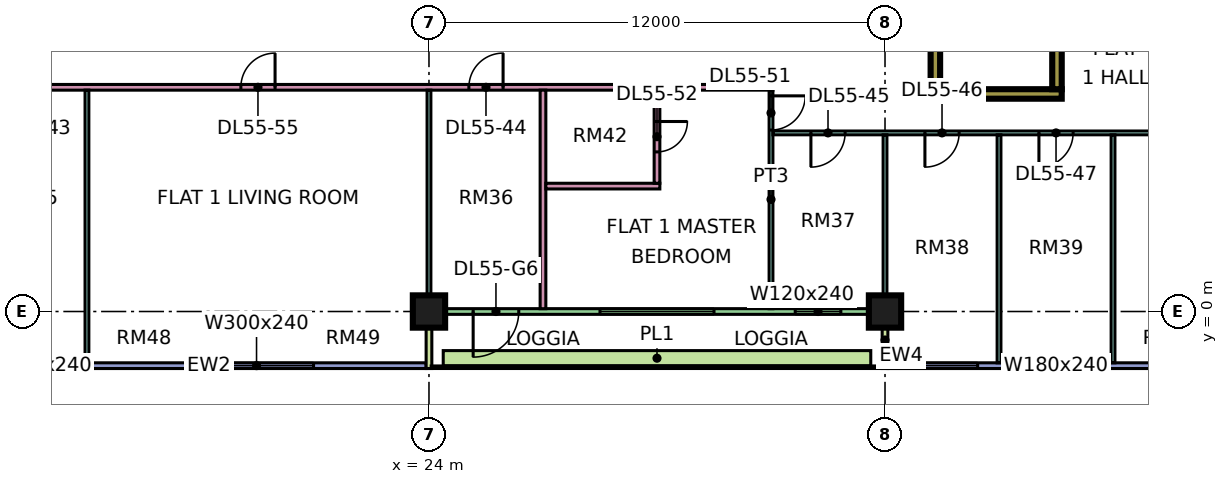
"""IFC4 building model, lengths in metres.
Left out: names, types, materials, properties, quantities, classifications, styles, units other than length and angle.
Written with IfcOpenShell. Run it as: python <this file> out.ifc"""

import sys

from ifc_helpers import new_model, si_unit, direction, frame, frame_2d, origin, origin_2d, place, context, subcontext, project, spatial, rectangle, extrude, element, fill, save


model = new_model("IFC4")
c1 = context("Model", 3, precision=1e-05, world=origin(), true_north=direction((0.0, 1.0)))
c2 = subcontext(c1, "Body", "Model", "MODEL_VIEW")
j1 = project(units=[si_unit("LENGTHUNIT", "METRE"), si_unit("PLANEANGLEUNIT", "RADIAN")], contexts=[c1])
p1 = place(None, origin())
s1 = spatial("IfcSite", under=j1, at=p1, CompositionType="ELEMENT")
p2 = place(p1, origin())
s2 = spatial("IfcBuilding", under=s1, at=p2, CompositionType="ELEMENT")
p3 = place(p2, frame((0.0, 0.0, 234.15)))
s3 = spatial("IfcBuildingStorey", under=s2, at=p3, CompositionType="ELEMENT", Elevation=234.15)
for number, where, z_axis, x_axis in (
    (1, (24.0, 0.0, 0.0), (0.0, 0.0, 1.0), (1.0, 0.0, 0.0)),
    (2, (36.0, 0.0, 0.0), (0.0, 0.0, 1.0), (1.0, 0.0, 0.0)),
):
    element("IfcColumn", number, at=place(p3, frame(where, z_axis=z_axis, x_axis=x_axis)), inside=s3, PredefinedType="COLUMN", context=c2, shape_type="SweptSolid", body=[
        extrude(rectangle(XDim=0.85, YDim=0.85, at=origin_2d()), origin(), (0.0, 0.0, 1.0), 3.75),
    ])
p4 = place(p3, frame((37.2, 5.725, 0.0), z_axis=(0.0, 0.0, 1.0), x_axis=(1.0, 0.0, 0.0)))
e3 = element("IfcWall", 3, at=p4, inside=s3, PredefinedType="SHEAR", context=c2, shape_type="SweptSolid", body=[
    extrude(rectangle(XDim=3.45, YDim=0.25, at=frame_2d((1.725, 0.0))), origin(), (0.0, 0.0, 1.0), 3.75),
])
for number, where, z_axis, x_axis in (
    (4, (37.325, 5.85, 0.0), (0.0, 0.0, 1.0), (0.0, 1.0, 0.0)),
    (5, (40.525, 5.85, 0.0), (0.0, 0.0, 1.0), (0.0, 1.0, 0.0)),
):
    element("IfcWall", number, at=place(p3, frame(where, z_axis=z_axis, x_axis=x_axis)), inside=s3, PredefinedType="SHEAR", context=c2, shape_type="SweptSolid", body=[
        extrude(rectangle(XDim=6.5, YDim=0.25, at=frame_2d((3.25, 0.0))), origin(), (0.0, 0.0, 1.0), 3.75),
    ])
p5 = place(p3, frame((12.5, -1.425, 0.0), z_axis=(0.0, 0.0, 1.0), x_axis=(1.0, 0.0, 0.0)))
e6 = element("IfcWall", 6, at=p5, inside=s3, PredefinedType="SOLIDWALL", context=c2, shape_type="SweptSolid", body=[
    extrude(rectangle(XDim=11.425, YDim=0.15, at=frame_2d((5.712, 0.0))), origin(), (0.0, 0.0, 1.0), 3.35),
])
p6 = place(p5, frame((0.35, 0.0, 0.45)))
e7 = element("IfcOpeningElement", 7, at=p6, cuts=e6, PredefinedType="OPENING", context=c2, shape_type="SweptSolid", body=[
    extrude(rectangle(XDim=1.8, YDim=2.4, at=frame_2d((0.9, 1.2))), frame((0.0, 0.085, 0.0), z_axis=(0.0, -1.0, 0.0), x_axis=(1.0, 0.0, 0.0)), (0.0, 0.0, 1.0), 0.17),
])
p7 = place(p5, frame((5.462, 0.0, 0.45)))
e8 = element("IfcOpeningElement", 8, at=p7, cuts=e6, PredefinedType="OPENING", context=c2, shape_type="SweptSolid", body=[
    extrude(rectangle(XDim=3.0, YDim=2.4, at=frame_2d((1.5, 1.2))), frame((0.0, 0.085, 0.0), z_axis=(0.0, -1.0, 0.0), x_axis=(1.0, 0.0, 0.0)), (0.0, 0.0, 1.0), 0.17),
])
p8 = place(p3, frame((24.075, 0.0, 0.0), z_axis=(0.0, 0.0, 1.0), x_axis=(1.0, 0.0, 0.0)))
e9 = element("IfcWall", 9, at=p8, inside=s3, PredefinedType="SOLIDWALL", context=c2, shape_type="SweptSolid", body=[
    extrude(rectangle(XDim=11.85, YDim=0.15, at=frame_2d((5.925, 0.0))), origin(), (0.0, 0.0, 1.0), 3.35),
])
p9 = place(p8, frame((1.087, 0.0, 0.0)))
e10 = element("IfcOpeningElement", 10, at=p9, cuts=e9, PredefinedType="OPENING", context=c2, shape_type="SweptSolid", body=[
    extrude(rectangle(XDim=1.2, YDim=2.4, at=frame_2d((0.6, 1.2))), frame((0.0, 0.085, 0.0), z_axis=(0.0, -1.0, 0.0), x_axis=(1.0, 0.0, 0.0)), (0.0, 0.0, 1.0), 0.17),
])
p10 = place(p8, frame((4.425, 0.0, 0.45)))
e11 = element("IfcOpeningElement", 11, at=p10, cuts=e9, PredefinedType="OPENING", context=c2, shape_type="SweptSolid", body=[
    extrude(rectangle(XDim=3.0, YDim=2.4, at=frame_2d((1.5, 1.2))), frame((0.0, 0.085, 0.0), z_axis=(0.0, -1.0, 0.0), x_axis=(1.0, 0.0, 0.0)), (0.0, 0.0, 1.0), 0.17),
])
p11 = place(p8, frame((9.562, 0.0, 0.45)))
e12 = element("IfcOpeningElement", 12, at=p11, cuts=e9, PredefinedType="OPENING", context=c2, shape_type="SweptSolid", body=[
    extrude(rectangle(XDim=1.2, YDim=2.4, at=frame_2d((0.6, 1.2))), frame((0.0, 0.085, 0.0), z_axis=(0.0, -1.0, 0.0), x_axis=(1.0, 0.0, 0.0)), (0.0, 0.0, 1.0), 0.17),
])
for number, where, z_axis, x_axis in (
    (13, (24.0, -1.5, 0.0), (0.0, 0.0, 1.0), (0.0, 1.0, 0.0)),
    (14, (36.0, -1.5, 0.0), (0.0, 0.0, 1.0), (0.0, 1.0, 0.0)),
):
    element("IfcWall", number, at=place(p3, frame(where, z_axis=z_axis, x_axis=x_axis)), inside=s3, PredefinedType="SOLIDWALL", context=c2, shape_type="SweptSolid", body=[
        extrude(rectangle(XDim=1.5, YDim=0.15, at=frame_2d((0.75, 0.0))), origin(), (0.0, 0.0, 1.0), 3.35),
    ])
p12 = place(p3, frame((36.075, -1.425, 0.0), z_axis=(0.0, 0.0, 1.0), x_axis=(1.0, 0.0, 0.0)))
e15 = element("IfcWall", 15, at=p12, inside=s3, PredefinedType="SOLIDWALL", context=c2, shape_type="SweptSolid", body=[
    extrude(rectangle(XDim=11.85, YDim=0.15, at=frame_2d((5.925, 0.0))), origin(), (0.0, 0.0, 1.0), 3.35),
])
p13 = place(p12, frame((0.562, 0.0, 0.45)))
e16 = element("IfcOpeningElement", 16, at=p13, cuts=e15, PredefinedType="OPENING", context=c2, shape_type="SweptSolid", body=[
    extrude(rectangle(XDim=1.8, YDim=2.4, at=frame_2d((0.9, 1.2))), frame((0.0, 0.085, 0.0), z_axis=(0.0, -1.0, 0.0), x_axis=(1.0, 0.0, 0.0)), (0.0, 0.0, 1.0), 0.17),
])
p14 = place(p12, frame((3.525, 0.0, 0.45)))
e17 = element("IfcOpeningElement", 17, at=p14, cuts=e15, PredefinedType="OPENING", context=c2, shape_type="SweptSolid", body=[
    extrude(rectangle(XDim=1.8, YDim=2.4, at=frame_2d((0.9, 1.2))), frame((0.0, 0.085, 0.0), z_axis=(0.0, -1.0, 0.0), x_axis=(1.0, 0.0, 0.0)), (0.0, 0.0, 1.0), 0.17),
])
p15 = place(p12, frame((7.387, 0.0, 0.45)))
e18 = element("IfcOpeningElement", 18, at=p15, cuts=e15, PredefinedType="OPENING", context=c2, shape_type="SweptSolid", body=[
    extrude(rectangle(XDim=3.0, YDim=2.4, at=frame_2d((1.5, 1.2))), frame((0.0, 0.085, 0.0), z_axis=(0.0, -1.0, 0.0), x_axis=(1.0, 0.0, 0.0)), (0.0, 0.0, 1.0), 0.17),
])
p16 = place(p3, frame((24.375, -1.229, 0.0), z_axis=(0.0, 0.0, 1.0), x_axis=(1.0, 0.0, 0.0)))
e19 = element("IfcWall", 19, at=p16, inside=s3, PredefinedType="SOLIDWALL", context=c2, shape_type="SweptSolid", body=[
    extrude(rectangle(XDim=11.25, YDim=0.4, at=frame_2d((5.625, 0.0))), origin(), (0.0, 0.0, 1.0), 0.7),
])
p17 = place(p3, frame((11.95, 5.9, 0.0), z_axis=(0.0, 0.0, 1.0), x_axis=(1.0, 0.0, 0.0)))
e20 = element("IfcWall", 20, at=p17, inside=s3, PredefinedType="PARTITIONING", context=c2, shape_type="SweptSolid", body=[
    extrude(rectangle(XDim=21.1, YDim=0.15, at=frame_2d((10.55, 0.0))), origin(), (0.0, 0.0, 1.0), 3.35),
])
p18 = place(p17, frame((1.1, 0.0, 0.0)))
e21 = element("IfcOpeningElement", 21, at=p18, cuts=e20, PredefinedType="OPENING", context=c2, shape_type="SweptSolid", body=[
    extrude(rectangle(XDim=0.9, YDim=2.1, at=frame_2d((0.45, 1.05))), frame((0.0, 0.085, 0.0), z_axis=(0.0, -1.0, 0.0), x_axis=(1.0, 0.0, 0.0)), (0.0, 0.0, 1.0), 0.17),
])
p19 = place(p17, frame((13.1, 0.0, 0.0)))
e22 = element("IfcOpeningElement", 22, at=p19, cuts=e20, PredefinedType="OPENING", context=c2, shape_type="SweptSolid", body=[
    extrude(rectangle(XDim=0.9, YDim=2.1, at=frame_2d((0.45, 1.05))), frame((0.0, 0.085, 0.0), z_axis=(0.0, -1.0, 0.0), x_axis=(1.0, 0.0, 0.0)), (0.0, 0.0, 1.0), 0.17),
])
p20 = place(p17, frame((7.1, 0.0, 0.0)))
e23 = element("IfcOpeningElement", 23, at=p20, cuts=e20, PredefinedType="OPENING", context=c2, shape_type="SweptSolid", body=[
    extrude(rectangle(XDim=0.9, YDim=2.1, at=frame_2d((0.45, 1.05))), frame((0.0, 0.085, 0.0), z_axis=(0.0, -1.0, 0.0), x_axis=(1.0, 0.0, 0.0)), (0.0, 0.0, 1.0), 0.17),
])
p21 = place(p3, frame((15.0, -1.35, 0.0), z_axis=(0.0, 0.0, 1.0), x_axis=(0.0, 1.0, 0.0)))
e24 = element("IfcWall", 24, at=p21, inside=s3, PredefinedType="PARTITIONING", context=c2, shape_type="SweptSolid", body=[
    extrude(rectangle(XDim=7.175, YDim=0.1, at=frame_2d((3.587, 0.0))), origin(), (0.0, 0.0, 1.0), 3.35),
])
p22 = place(p3, frame((24.0, 0.0, 0.0), z_axis=(0.0, 0.0, 1.0), x_axis=(0.0, 1.0, 0.0)))
e25 = element("IfcWall", 25, at=p22, inside=s3, PredefinedType="PARTITIONING", context=c2, shape_type="SweptSolid", body=[
    extrude(rectangle(XDim=5.825, YDim=0.1, at=frame_2d((2.913, 0.0))), origin(), (0.0, 0.0, 1.0), 3.35),
])
p23 = place(p3, frame((27.0, 0.074, 0.0), z_axis=(0.0, 0.0, 1.0), x_axis=(0.0, 1.0, 0.0)))
e26 = element("IfcWall", 26, at=p23, inside=s3, PredefinedType="PARTITIONING", context=c2, shape_type="SweptSolid", body=[
    extrude(rectangle(XDim=5.751, YDim=0.15, at=frame_2d((2.875, 0.0))), origin(), (0.0, 0.0, 1.0), 3.35),
])
p24 = place(p3, frame((27.075, 3.3, 0.0), z_axis=(0.0, 0.0, 1.0), x_axis=(1.0, 0.0, 0.0)))
e27 = element("IfcWall", 27, at=p24, inside=s3, PredefinedType="PARTITIONING", context=c2, shape_type="SweptSolid", body=[
    extrude(rectangle(XDim=3.0, YDim=0.15, at=frame_2d((1.5, 0.0))), origin(), (0.0, 0.0, 1.0), 3.35),
])
p25 = place(p3, frame((30.0, 3.375, 0.0), z_axis=(0.0, 0.0, 1.0), x_axis=(0.0, 1.0, 0.0)))
e28 = element("IfcWall", 28, at=p25, inside=s3, PredefinedType="PARTITIONING", context=c2, shape_type="SweptSolid", body=[
    extrude(rectangle(XDim=2.45, YDim=0.15, at=frame_2d((1.225, 0.0))), origin(), (0.0, 0.0, 1.0), 3.35),
])
p26 = place(p25, frame((0.825, 0.0, 0.0)))
e29 = element("IfcOpeningElement", 29, at=p26, cuts=e28, PredefinedType="OPENING", context=c2, shape_type="SweptSolid", body=[
    extrude(rectangle(XDim=0.8, YDim=2.1, at=frame_2d((0.4, 1.05))), frame((0.0, 0.085, 0.0), z_axis=(0.0, -1.0, 0.0), x_axis=(1.0, 0.0, 0.0)), (0.0, 0.0, 1.0), 0.17),
])
p27 = place(p3, frame((33.0, 0.074, 0.0), z_axis=(0.0, 0.0, 1.0), x_axis=(0.0, 1.0, 0.0)))
e30 = element("IfcWall", 30, at=p27, inside=s3, PredefinedType="PARTITIONING", context=c2, shape_type="SweptSolid", body=[
    extrude(rectangle(XDim=5.751, YDim=0.1, at=frame_2d((2.875, 0.0))), origin(), (0.0, 0.0, 1.0), 3.35),
])
p28 = place(p27, frame((4.701, 0.0, 0.0)))
e31 = element("IfcOpeningElement", 31, at=p28, cuts=e30, PredefinedType="OPENING", context=c2, shape_type="SweptSolid", body=[
    extrude(rectangle(XDim=0.9, YDim=2.1, at=frame_2d((0.45, 1.05))), frame((0.0, 0.06, 0.0), z_axis=(0.0, -1.0, 0.0), x_axis=(1.0, 0.0, 0.0)), (0.0, 0.0, 1.0), 0.12),
])
p29 = place(p3, frame((33.05, 4.7, 0.0), z_axis=(0.0, 0.0, 1.0), x_axis=(1.0, 0.0, 0.0)))
e32 = element("IfcWall", 32, at=p29, inside=s3, PredefinedType="PARTITIONING", context=c2, shape_type="SweptSolid", body=[
    extrude(rectangle(XDim=20.85, YDim=0.1, at=frame_2d((10.425, 0.0))), origin(), (0.0, 0.0, 1.0), 3.35),
])
p30 = place(p29, frame((1.0, 0.0, 0.0)))
e33 = element("IfcOpeningElement", 33, at=p30, cuts=e32, PredefinedType="OPENING", context=c2, shape_type="SweptSolid", body=[
    extrude(rectangle(XDim=0.9, YDim=2.1, at=frame_2d((0.45, 1.05))), frame((0.0, 0.06, 0.0), z_axis=(0.0, -1.0, 0.0), x_axis=(1.0, 0.0, 0.0)), (0.0, 0.0, 1.0), 0.12),
])
p31 = place(p29, frame((4.0, 0.0, 0.0)))
e34 = element("IfcOpeningElement", 34, at=p31, cuts=e32, PredefinedType="OPENING", context=c2, shape_type="SweptSolid", body=[
    extrude(rectangle(XDim=0.9, YDim=2.1, at=frame_2d((0.45, 1.05))), frame((0.0, 0.06, 0.0), z_axis=(0.0, -1.0, 0.0), x_axis=(1.0, 0.0, 0.0)), (0.0, 0.0, 1.0), 0.12),
])
p32 = place(p29, frame((7.0, 0.0, 0.0)))
e35 = element("IfcOpeningElement", 35, at=p32, cuts=e32, PredefinedType="OPENING", context=c2, shape_type="SweptSolid", body=[
    extrude(rectangle(XDim=0.9, YDim=2.1, at=frame_2d((0.45, 1.05))), frame((0.0, 0.06, 0.0), z_axis=(0.0, -1.0, 0.0), x_axis=(1.0, 0.0, 0.0)), (0.0, 0.0, 1.0), 0.12),
])
p33 = place(p29, frame((19.0, 0.0, 0.0)))
e36 = element("IfcOpeningElement", 36, at=p33, cuts=e32, PredefinedType="OPENING", context=c2, shape_type="SweptSolid", body=[
    extrude(rectangle(XDim=0.9, YDim=2.1, at=frame_2d((0.45, 1.05))), frame((0.0, 0.06, 0.0), z_axis=(0.0, -1.0, 0.0), x_axis=(1.0, 0.0, 0.0)), (0.0, 0.0, 1.0), 0.12),
])
p34 = place(p29, frame((13.0, 0.0, 0.0)))
e37 = element("IfcOpeningElement", 37, at=p34, cuts=e32, PredefinedType="OPENING", context=c2, shape_type="SweptSolid", body=[
    extrude(rectangle(XDim=0.9, YDim=2.1, at=frame_2d((0.45, 1.05))), frame((0.0, 0.06, 0.0), z_axis=(0.0, -1.0, 0.0), x_axis=(1.0, 0.0, 0.0)), (0.0, 0.0, 1.0), 0.12),
])
p35 = place(p3, frame((36.0, 0.0, 0.0), z_axis=(0.0, 0.0, 1.0), x_axis=(0.0, 1.0, 0.0)))
e38 = element("IfcWall", 38, at=p35, inside=s3, PredefinedType="PARTITIONING", context=c2, shape_type="SweptSolid", body=[
    extrude(rectangle(XDim=4.65, YDim=0.1, at=frame_2d((2.325, 0.0))), origin(), (0.0, 0.0, 1.0), 3.35),
])
p36 = place(p3, frame((39.0, -1.351, 0.0), z_axis=(0.0, 0.0, 1.0), x_axis=(0.0, 1.0, 0.0)))
e39 = element("IfcWall", 39, at=p36, inside=s3, PredefinedType="PARTITIONING", context=c2, shape_type="SweptSolid", body=[
    extrude(rectangle(XDim=6.001, YDim=0.1, at=frame_2d((3.0, 0.0))), origin(), (0.0, 0.0, 1.0), 3.35),
])
p37 = place(p3, frame((42.0, -1.35, 0.0), z_axis=(0.0, 0.0, 1.0), x_axis=(0.0, 1.0, 0.0)))
e40 = element("IfcWall", 40, at=p37, inside=s3, PredefinedType="PARTITIONING", context=c2, shape_type="SweptSolid", body=[
    extrude(rectangle(XDim=6.0, YDim=0.1, at=frame_2d((3.0, 0.0))), origin(), (0.0, 0.0, 1.0), 3.35),
])
p38 = place(p6, origin())
e41 = element("IfcWindow", 41, at=p38, inside=s3, PartitioningType="SINGLE_PANEL", PredefinedType="WINDOW", context=c2, shape_type="SweptSolid", body=[
    extrude(rectangle(XDim=1.8, YDim=2.4, at=frame_2d((0.9, 1.2))), frame((0.0, 0.03, 0.0), z_axis=(0.0, -1.0, 0.0), x_axis=(1.0, 0.0, 0.0)), (0.0, 0.0, 1.0), 0.06),
])
fill(e7, e41)
p39 = place(p7, origin())
e42 = element("IfcWindow", 42, at=p39, inside=s3, PartitioningType="SINGLE_PANEL", PredefinedType="WINDOW", context=c2, shape_type="SweptSolid", body=[
    extrude(rectangle(XDim=3.0, YDim=2.4, at=frame_2d((1.5, 1.2))), frame((0.0, 0.03, 0.0), z_axis=(0.0, -1.0, 0.0), x_axis=(1.0, 0.0, 0.0)), (0.0, 0.0, 1.0), 0.06),
])
fill(e8, e42)
p40 = place(p9, frame((1.2, 0.0, 0.0), z_axis=(0.0, 0.0, 1.0), x_axis=(-1.0, 0.0, 0.0)))
e43 = element("IfcDoor", 43, at=p40, inside=s3, OperationType="DOUBLE_DOOR_SINGLE_SWING", PredefinedType="DOOR", context=c2, shape_type="SweptSolid", body=[
    extrude(rectangle(XDim=1.2, YDim=2.4, at=frame_2d((0.6, 1.2))), frame((0.0, 0.025, 0.0), z_axis=(0.0, -1.0, 0.0), x_axis=(1.0, 0.0, 0.0)), (0.0, 0.0, 1.0), 0.05),
])
fill(e10, e43)
p41 = place(p10, origin())
e44 = element("IfcWindow", 44, at=p41, inside=s3, PartitioningType="SINGLE_PANEL", PredefinedType="WINDOW", context=c2, shape_type="SweptSolid", body=[
    extrude(rectangle(XDim=3.0, YDim=2.4, at=frame_2d((1.5, 1.2))), frame((0.0, 0.03, 0.0), z_axis=(0.0, -1.0, 0.0), x_axis=(1.0, 0.0, 0.0)), (0.0, 0.0, 1.0), 0.06),
])
fill(e11, e44)
p42 = place(p11, origin())
e45 = element("IfcWindow", 45, at=p42, inside=s3, PartitioningType="SINGLE_PANEL", PredefinedType="WINDOW", context=c2, shape_type="SweptSolid", body=[
    extrude(rectangle(XDim=1.2, YDim=2.4, at=frame_2d((0.6, 1.2))), frame((0.0, 0.03, 0.0), z_axis=(0.0, -1.0, 0.0), x_axis=(1.0, 0.0, 0.0)), (0.0, 0.0, 1.0), 0.06),
])
fill(e12, e45)
p43 = place(p13, origin())
e46 = element("IfcWindow", 46, at=p43, inside=s3, PartitioningType="SINGLE_PANEL", PredefinedType="WINDOW", context=c2, shape_type="SweptSolid", body=[
    extrude(rectangle(XDim=1.8, YDim=2.4, at=frame_2d((0.9, 1.2))), frame((0.0, 0.03, 0.0), z_axis=(0.0, -1.0, 0.0), x_axis=(1.0, 0.0, 0.0)), (0.0, 0.0, 1.0), 0.06),
])
fill(e16, e46)
p44 = place(p14, origin())
e47 = element("IfcWindow", 47, at=p44, inside=s3, PartitioningType="SINGLE_PANEL", PredefinedType="WINDOW", context=c2, shape_type="SweptSolid", body=[
    extrude(rectangle(XDim=1.8, YDim=2.4, at=frame_2d((0.9, 1.2))), frame((0.0, 0.03, 0.0), z_axis=(0.0, -1.0, 0.0), x_axis=(1.0, 0.0, 0.0)), (0.0, 0.0, 1.0), 0.06),
])
fill(e17, e47)
p45 = place(p19, frame((0.9, 0.0, 0.0), z_axis=(0.0, 0.0, 1.0), x_axis=(-1.0, 0.0, 0.0)))
e48 = element("IfcDoor", 48, at=p45, inside=s3, OperationType="SINGLE_SWING_RIGHT", PredefinedType="DOOR", context=c2, shape_type="SweptSolid", body=[
    extrude(rectangle(XDim=0.9, YDim=2.1, at=frame_2d((0.45, 1.05))), frame((0.0, 0.025, 0.0), z_axis=(0.0, -1.0, 0.0), x_axis=(1.0, 0.0, 0.0)), (0.0, 0.0, 1.0), 0.05),
])
fill(e22, e48)
p46 = place(p30, frame((0.9, 0.0, 0.0), z_axis=(0.0, 0.0, 1.0), x_axis=(-1.0, 0.0, 0.0)))
e49 = element("IfcDoor", 49, at=p46, inside=s3, OperationType="SINGLE_SWING_LEFT", PredefinedType="DOOR", context=c2, shape_type="SweptSolid", body=[
    extrude(rectangle(XDim=0.9, YDim=2.1, at=frame_2d((0.45, 1.05))), frame((0.0, 0.025, 0.0), z_axis=(0.0, -1.0, 0.0), x_axis=(1.0, 0.0, 0.0)), (0.0, 0.0, 1.0), 0.05),
])
fill(e33, e49)
p47 = place(p31, frame((0.9, 0.0, 0.0), z_axis=(0.0, 0.0, 1.0), x_axis=(-1.0, 0.0, 0.0)))
e50 = element("IfcDoor", 50, at=p47, inside=s3, OperationType="SINGLE_SWING_LEFT", PredefinedType="DOOR", context=c2, shape_type="SweptSolid", body=[
    extrude(rectangle(XDim=0.9, YDim=2.1, at=frame_2d((0.45, 1.05))), frame((0.0, 0.025, 0.0), z_axis=(0.0, -1.0, 0.0), x_axis=(1.0, 0.0, 0.0)), (0.0, 0.0, 1.0), 0.05),
])
fill(e34, e50)
p48 = place(p32, frame((0.9, 0.0, 0.0), z_axis=(0.0, 0.0, 1.0), x_axis=(-1.0, 0.0, 0.0)))
e51 = element("IfcDoor", 51, at=p48, inside=s3, OperationType="SINGLE_SWING_LEFT", PredefinedType="DOOR", context=c2, shape_type="SweptSolid", body=[
    extrude(rectangle(XDim=0.9, YDim=2.1, at=frame_2d((0.45, 1.05))), frame((0.0, 0.025, 0.0), z_axis=(0.0, -1.0, 0.0), x_axis=(1.0, 0.0, 0.0)), (0.0, 0.0, 1.0), 0.05),
])
fill(e35, e51)
p49 = place(p28, origin())
e52 = element("IfcDoor", 52, at=p49, inside=s3, OperationType="SINGLE_SWING_RIGHT", PredefinedType="DOOR", context=c2, shape_type="SweptSolid", body=[
    extrude(rectangle(XDim=0.9, YDim=2.1, at=frame_2d((0.45, 1.05))), frame((0.0, 0.025, 0.0), z_axis=(0.0, -1.0, 0.0), x_axis=(1.0, 0.0, 0.0)), (0.0, 0.0, 1.0), 0.05),
])
fill(e31, e52)
p50 = place(p26, origin())
e53 = element("IfcDoor", 53, at=p50, inside=s3, OperationType="SINGLE_SWING_RIGHT", PredefinedType="DOOR", context=c2, shape_type="SweptSolid", body=[
    extrude(rectangle(XDim=0.8, YDim=2.1, at=frame_2d((0.4, 1.05))), frame((0.0, 0.025, 0.0), z_axis=(0.0, -1.0, 0.0), x_axis=(1.0, 0.0, 0.0)), (0.0, 0.0, 1.0), 0.05),
])
fill(e29, e53)
p51 = place(p20, frame((0.9, 0.0, 0.0), z_axis=(0.0, 0.0, 1.0), x_axis=(-1.0, 0.0, 0.0)))
e54 = element("IfcDoor", 54, at=p51, inside=s3, OperationType="SINGLE_SWING_RIGHT", PredefinedType="DOOR", context=c2, shape_type="SweptSolid", body=[
    extrude(rectangle(XDim=0.9, YDim=2.1, at=frame_2d((0.45, 1.05))), frame((0.0, 0.025, 0.0), z_axis=(0.0, -1.0, 0.0), x_axis=(1.0, 0.0, 0.0)), (0.0, 0.0, 1.0), 0.05),
])
fill(e23, e54)
save(model, sys.argv[1])
